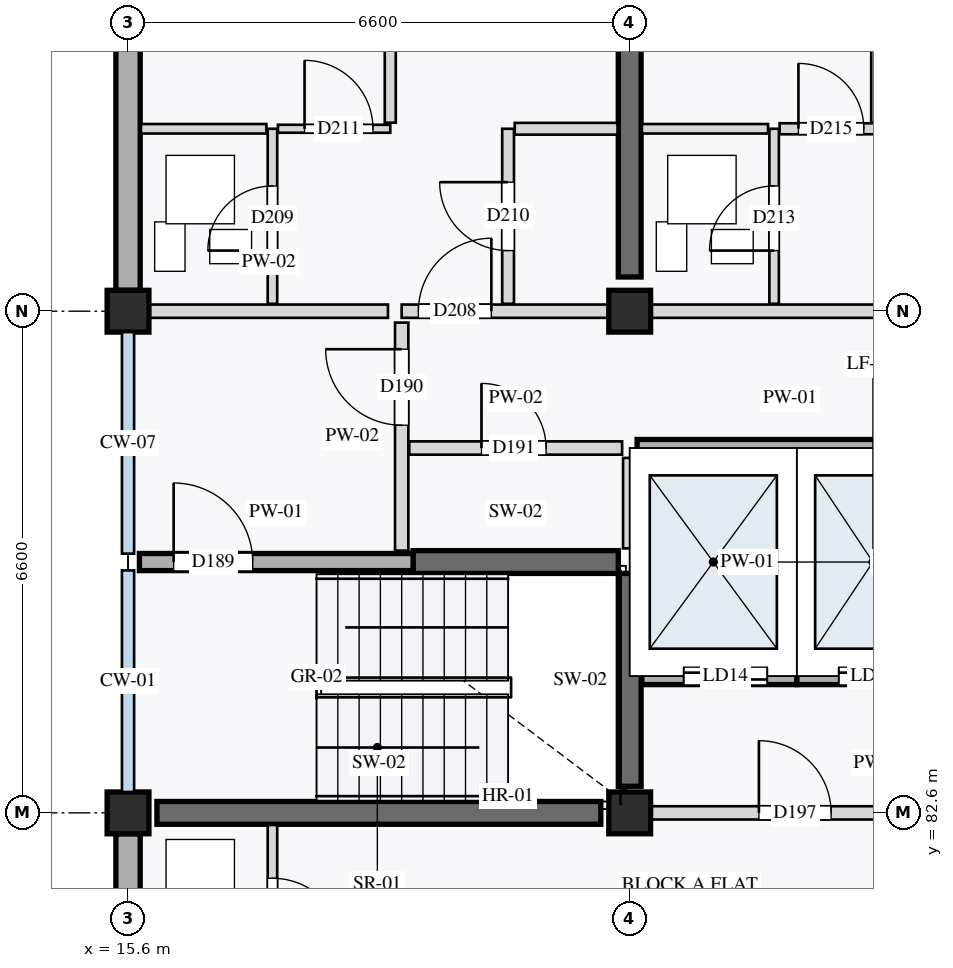
"""IFC4 building model, lengths in metres.
Left out: names, types, materials, properties, quantities, classifications, styles, units other than length and angle.
Written with IfcOpenShell. Run it as: python <this file> out.ifc"""

import sys

from ifc_helpers import new_model, si_unit, direction, frame, frame_2d, origin, origin_2d, place, context, subcontext, project, spatial, rectangle, extrude, element, fill, save


model = new_model("IFC4")
c1 = context("Model", 3, precision=1e-05, world=origin(), true_north=direction((0.0, 1.0)))
c2 = subcontext(c1, "Body", "Model", "MODEL_VIEW")
j1 = project(units=[si_unit("LENGTHUNIT", "METRE"), si_unit("PLANEANGLEUNIT", "RADIAN")], contexts=[c1])
p1 = place(None, origin())
s1 = spatial("IfcSite", under=j1, at=p1, CompositionType="ELEMENT")
p2 = place(p1, origin())
s2 = spatial("IfcBuilding", under=s1, at=p2, CompositionType="ELEMENT")
p3 = place(p2, frame((0.0, 0.0, 21.2)))
s3 = spatial("IfcBuildingStorey", under=s2, at=p3, CompositionType="ELEMENT", Elevation=21.2)
for number, where, z_axis, x_axis in (
    (1, (15.6, 82.6, 0.0), (0.0, 0.0, 1.0), (1.0, 0.0, 0.0)),
    (2, (15.6, 89.2, 0.0), (0.0, 0.0, 1.0), (1.0, 0.0, 0.0)),
    (3, (22.2, 82.6, 0.0), (0.0, 0.0, 1.0), (1.0, 0.0, 0.0)),
    (4, (22.2, 89.2, 0.0), (0.0, 0.0, 1.0), (1.0, 0.0, 0.0)),
):
    element("IfcColumn", number, at=place(p3, frame(where, z_axis=z_axis, x_axis=x_axis)), inside=s3, PredefinedType="COLUMN", context=c2, shape_type="SweptSolid", body=[
        extrude(rectangle(XDim=0.55, YDim=0.55, at=origin_2d()), origin(), (0.0, 0.0, 1.0), 3.2),
    ])
p4 = place(p3, frame((15.98, 82.6, 0.0), z_axis=(0.0, 0.0, 1.0), x_axis=(1.0, 0.0, 0.0)))
e5 = element("IfcWall", 5, at=p4, inside=s3, PredefinedType="SHEAR", context=c2, shape_type="SweptSolid", body=[
    extrude(rectangle(XDim=5.84, YDim=0.3, at=frame_2d((2.92, 0.0))), origin(), (0.0, 0.0, 1.0), 2.96),
])
p5 = place(p3, frame((19.35, 85.9, 0.0), z_axis=(0.0, 0.0, 1.0), x_axis=(1.0, 0.0, 0.0)))
e6 = element("IfcWall", 6, at=p5, inside=s3, PredefinedType="SHEAR", context=c2, shape_type="SweptSolid", body=[
    extrude(rectangle(XDim=2.7, YDim=0.3, at=frame_2d((1.35, 0.0))), origin(), (0.0, 0.0, 1.0), 2.96),
])
p6 = place(p3, frame((22.2, 82.95, 0.0), z_axis=(0.0, 0.0, 1.0), x_axis=(0.0, 1.0, 0.0)))
e7 = element("IfcWall", 7, at=p6, inside=s3, PredefinedType="SHEAR", context=c2, shape_type="SweptSolid", body=[
    extrude(rectangle(XDim=2.8, YDim=0.3, at=frame_2d((1.4, 0.0))), origin(), (0.0, 0.0, 1.0), 2.96),
])
p7 = place(p3, frame((22.2, 89.65, 0.0), z_axis=(0.0, 0.0, 1.0), x_axis=(0.0, 1.0, 0.0)))
e8 = element("IfcWall", 8, at=p7, inside=s3, PredefinedType="SHEAR", context=c2, shape_type="SweptSolid", body=[
    extrude(rectangle(XDim=5.7, YDim=0.3, at=frame_2d((2.85, 0.0))), origin(), (0.0, 0.0, 1.0), 2.96),
])
p8 = place(p3, frame((15.6, 76.275, 0.0), z_axis=(0.0, 0.0, 1.0), x_axis=(0.0, 1.0, 0.0)))
e9 = element("IfcWall", 9, at=p8, inside=s3, PredefinedType="STANDARD", context=c2, shape_type="SweptSolid", body=[
    extrude(rectangle(XDim=6.05, YDim=0.32, at=frame_2d((3.025, 0.0))), origin(), (0.0, 0.0, 1.0), 2.65),
])
p9 = place(p3, frame((15.6, 89.475, 0.0), z_axis=(0.0, 0.0, 1.0), x_axis=(0.0, 1.0, 0.0)))
e10 = element("IfcWall", 10, at=p9, inside=s3, PredefinedType="STANDARD", context=c2, shape_type="SweptSolid", body=[
    extrude(rectangle(XDim=6.05, YDim=0.32, at=frame_2d((3.025, 0.0))), origin(), (0.0, 0.0, 1.0), 2.65),
])
p10 = place(p3, frame((15.75, 85.9, 0.0), z_axis=(0.0, 0.0, 1.0), x_axis=(1.0, 0.0, 0.0)))
e11 = element("IfcWall", 11, at=p10, inside=s3, PredefinedType="STANDARD", context=c2, shape_type="SweptSolid", body=[
    extrude(rectangle(XDim=3.6, YDim=0.225, at=frame_2d((1.8, 0.0))), origin(), (0.0, 0.0, 1.0), 2.96),
])
p11 = place(p10, frame((0.45, 0.0, 0.0)))
e12 = element("IfcOpeningElement", 12, at=p11, cuts=e11, PredefinedType="OPENING", context=c2, shape_type="SweptSolid", body=[
    extrude(rectangle(XDim=1.04, YDim=2.12, at=frame_2d((0.52, 1.06))), frame((0.0, 0.123, 0.0), z_axis=(0.0, -1.0, 0.0), x_axis=(1.0, 0.0, 0.0)), (0.0, 0.0, 1.0), 0.245),
])
p12 = place(p3, frame((19.2, 86.05, 0.0), z_axis=(0.0, 0.0, 1.0), x_axis=(0.0, 1.0, 0.0)))
e13 = element("IfcWall", 13, at=p12, inside=s3, PredefinedType="PARTITIONING", context=c2, shape_type="SweptSolid", body=[
    extrude(rectangle(XDim=3.0, YDim=0.175, at=frame_2d((1.5, 0.0))), origin(), (0.0, 0.0, 1.0), 2.96),
])
p13 = place(p12, frame((1.65, 0.0, 0.0)))
e14 = element("IfcOpeningElement", 14, at=p13, cuts=e13, PredefinedType="OPENING", context=c2, shape_type="SweptSolid", body=[
    extrude(rectangle(XDim=1.0, YDim=2.1, at=frame_2d((0.5, 1.05))), frame((0.0, 0.097, 0.0), z_axis=(0.0, -1.0, 0.0), x_axis=(1.0, 0.0, 0.0)), (0.0, 0.0, 1.0), 0.195),
])
p14 = place(p3, frame((19.3, 87.4, 0.0), z_axis=(0.0, 0.0, 1.0), x_axis=(1.0, 0.0, 0.0)))
e15 = element("IfcWall", 15, at=p14, inside=s3, PredefinedType="PARTITIONING", context=c2, shape_type="SweptSolid", body=[
    extrude(rectangle(XDim=2.8, YDim=0.175, at=frame_2d((1.4, 0.0))), origin(), (0.0, 0.0, 1.0), 2.96),
])
p15 = place(p14, frame((0.95, 0.0, 0.0)))
e16 = element("IfcOpeningElement", 16, at=p15, cuts=e15, PredefinedType="OPENING", context=c2, shape_type="SweptSolid", body=[
    extrude(rectangle(XDim=0.85, YDim=2.0, at=frame_2d((0.425, 1.0))), frame((0.0, 0.097, 0.0), z_axis=(0.0, -1.0, 0.0), x_axis=(1.0, 0.0, 0.0)), (0.0, 0.0, 1.0), 0.195),
])
p16 = place(p3, frame((22.2, 86.08, 0.0), z_axis=(0.0, 0.0, 1.0), x_axis=(0.0, 1.0, 0.0)))
e17 = element("IfcWall", 17, at=p16, inside=s3, PredefinedType="PARTITIONING", context=c2, shape_type="SweptSolid", body=[
    extrude(rectangle(XDim=1.19, YDim=0.175, at=frame_2d((0.595, 0.0))), origin(), (0.0, 0.0, 1.0), 2.96),
])
p17 = place(p3, frame((22.36, 84.4, 0.0), z_axis=(0.0, 0.0, 1.0), x_axis=(1.0, 0.0, 0.0)))
e18 = element("IfcWall", 18, at=p17, inside=s3, PredefinedType="STANDARD", context=c2, shape_type="SweptSolid", body=[
    extrude(rectangle(XDim=2.04, YDim=0.225, at=frame_2d((1.02, 0.0))), origin(), (0.0, 0.0, 1.0), 2.96),
])
p18 = place(p17, frame((0.55, 0.0, 0.0)))
e19 = element("IfcOpeningElement", 19, at=p18, cuts=e18, PredefinedType="OPENING", context=c2, shape_type="SweptSolid", body=[
    extrude(rectangle(XDim=1.1, YDim=2.1, at=frame_2d((0.55, 1.05))), frame((0.0, 0.123, 0.0), z_axis=(0.0, -1.0, 0.0), x_axis=(1.0, 0.0, 0.0)), (0.0, 0.0, 1.0), 0.245),
])
p19 = place(p3, frame((24.4, 84.4, 0.0), z_axis=(0.0, 0.0, 1.0), x_axis=(1.0, 0.0, 0.0)))
e20 = element("IfcWall", 20, at=p19, inside=s3, PredefinedType="STANDARD", context=c2, shape_type="SweptSolid", body=[
    extrude(rectangle(XDim=2.0, YDim=0.225, at=frame_2d((1.0, 0.0))), origin(), (0.0, 0.0, 1.0), 2.96),
])
p20 = place(p19, frame((0.55, 0.0, 0.0)))
e21 = element("IfcOpeningElement", 21, at=p20, cuts=e20, PredefinedType="OPENING", context=c2, shape_type="SweptSolid", body=[
    extrude(rectangle(XDim=0.9, YDim=2.1, at=frame_2d((0.45, 1.05))), frame((0.0, 0.123, 0.0), z_axis=(0.0, -1.0, 0.0), x_axis=(1.0, 0.0, 0.0)), (0.0, 0.0, 1.0), 0.245),
])
p21 = place(p3, frame((22.298, 87.4, 0.0), z_axis=(0.0, 0.0, 1.0), x_axis=(1.0, 0.0, 0.0)))
e22 = element("IfcWall", 22, at=p21, inside=s3, PredefinedType="STANDARD", context=c2, shape_type="SweptSolid", body=[
    extrude(rectangle(XDim=4.022, YDim=0.225, at=frame_2d((2.011, 0.0))), origin(), (0.0, 0.0, 1.0), 2.96),
])
p22 = place(p3, frame((24.4, 84.58, 0.0), z_axis=(0.0, 0.0, 1.0), x_axis=(0.0, 1.0, 0.0)))
e23 = element("IfcWall", 23, at=p22, inside=s3, PredefinedType="STANDARD", context=c2, shape_type="SweptSolid", body=[
    extrude(rectangle(XDim=2.64, YDim=0.225, at=frame_2d((1.32, 0.0))), origin(), (0.0, 0.0, 1.0), 2.96),
])
p23 = place(p3, frame((22.2, 82.6, 0.0), z_axis=(0.0, 0.0, 1.0), x_axis=(1.0, 0.0, 0.0)))
e24 = element("IfcWall", 24, at=p23, inside=s3, PredefinedType="PARTITIONING", context=c2, shape_type="SweptSolid", body=[
    extrude(rectangle(XDim=6.6, YDim=0.175, at=frame_2d((3.3, 0.0))), origin(), (0.0, 0.0, 1.0), 2.55),
])
p24 = place(p23, frame((1.7, 0.0, 0.0)))
e25 = element("IfcOpeningElement", 25, at=p24, cuts=e24, PredefinedType="OPENING", context=c2, shape_type="SweptSolid", body=[
    extrude(rectangle(XDim=0.95, YDim=2.1, at=frame_2d((0.475, 1.05))), frame((0.0, 0.097, 0.0), z_axis=(0.0, -1.0, 0.0), x_axis=(1.0, 0.0, 0.0)), (0.0, 0.0, 1.0), 0.195),
])
p25 = place(p3, frame((17.5, 82.44, 0.0), z_axis=(0.0, 0.0, 1.0), x_axis=(0.0, -1.0, 0.0)))
e26 = element("IfcWall", 26, at=p25, inside=s3, PredefinedType="PARTITIONING", context=c2, shape_type="SweptSolid", body=[
    extrude(rectangle(XDim=2.24, YDim=0.125, at=frame_2d((1.12, 0.0))), origin(), (0.0, 0.0, 1.0), 2.96),
])
p26 = place(p25, frame((0.7, 0.0, 0.0)))
e27 = element("IfcOpeningElement", 27, at=p26, cuts=e26, PredefinedType="OPENING", context=c2, shape_type="SweptSolid", body=[
    extrude(rectangle(XDim=0.94, YDim=2.08, at=frame_2d((0.47, 1.04))), frame((0.0, 0.073, 0.0), z_axis=(0.0, -1.0, 0.0), x_axis=(1.0, 0.0, 0.0)), (0.0, 0.0, 1.0), 0.145),
])
p27 = place(p3, frame((15.88, 89.2, 0.0), z_axis=(0.0, 0.0, 1.0), x_axis=(1.0, 0.0, 0.0)))
e28 = element("IfcWall", 28, at=p27, inside=s3, PredefinedType="PARTITIONING", context=c2, shape_type="SweptSolid", body=[
    extrude(rectangle(XDim=3.14, YDim=0.175, at=frame_2d((1.57, 0.0))), origin(), (0.0, 0.0, 1.0), 2.55),
])
p28 = place(p3, frame((19.2, 89.2, 0.0), z_axis=(0.0, 0.0, 1.0), x_axis=(1.0, 0.0, 0.0)))
e29 = element("IfcWall", 29, at=p28, inside=s3, PredefinedType="PARTITIONING", context=c2, shape_type="SweptSolid", body=[
    extrude(rectangle(XDim=3.0, YDim=0.175, at=frame_2d((1.5, 0.0))), origin(), (0.0, 0.0, 1.0), 2.55),
])
p29 = place(p28, frame((0.22, 0.0, 0.0)))
e30 = element("IfcOpeningElement", 30, at=p29, cuts=e29, PredefinedType="OPENING", context=c2, shape_type="SweptSolid", body=[
    extrude(rectangle(XDim=0.96, YDim=2.18, at=frame_2d((0.48, 1.09))), frame((0.0, 0.097, 0.0), z_axis=(0.0, -1.0, 0.0), x_axis=(1.0, 0.0, 0.0)), (0.0, 0.0, 1.0), 0.195),
])
p30 = place(p3, frame((17.5, 89.298, 0.0), z_axis=(0.0, 0.0, 1.0), x_axis=(0.0, 1.0, 0.0)))
e31 = element("IfcWall", 31, at=p30, inside=s3, PredefinedType="PARTITIONING", context=c2, shape_type="SweptSolid", body=[
    extrude(rectangle(XDim=2.302, YDim=0.125, at=frame_2d((1.151, 0.0))), origin(), (0.0, 0.0, 1.0), 2.96),
])
p31 = place(p30, frame((0.7, 0.0, 0.0)))
e32 = element("IfcOpeningElement", 32, at=p31, cuts=e31, PredefinedType="OPENING", context=c2, shape_type="SweptSolid", body=[
    extrude(rectangle(XDim=0.85, YDim=2.04, at=frame_2d((0.425, 1.02))), frame((0.0, 0.073, 0.0), z_axis=(0.0, -1.0, 0.0), x_axis=(1.0, 0.0, 0.0)), (0.0, 0.0, 1.0), 0.145),
])
p32 = place(p3, frame((15.77, 91.6, 0.0), z_axis=(0.0, 0.0, 1.0), x_axis=(1.0, 0.0, 0.0)))
e33 = element("IfcWall", 33, at=p32, inside=s3, PredefinedType="PARTITIONING", context=c2, shape_type="SweptSolid", body=[
    extrude(rectangle(XDim=1.65, YDim=0.125, at=frame_2d((0.825, 0.0))), origin(), (0.0, 0.0, 1.0), 2.96),
])
p33 = place(p3, frame((20.6, 89.298, 0.0), z_axis=(0.0, 0.0, 1.0), x_axis=(0.0, 1.0, 0.0)))
e34 = element("IfcWall", 34, at=p33, inside=s3, PredefinedType="PARTITIONING", context=c2, shape_type="SweptSolid", body=[
    extrude(rectangle(XDim=2.302, YDim=0.155, at=frame_2d((1.151, 0.0))), origin(), (0.0, 0.0, 1.0), 2.96),
])
p34 = place(p33, frame((0.7, 0.0, 0.0)))
e35 = element("IfcOpeningElement", 35, at=p34, cuts=e34, PredefinedType="OPENING", context=c2, shape_type="SweptSolid", body=[
    extrude(rectangle(XDim=0.9, YDim=2.1, at=frame_2d((0.45, 1.05))), frame((0.0, 0.087, 0.0), z_axis=(0.0, -1.0, 0.0), x_axis=(1.0, 0.0, 0.0)), (0.0, 0.0, 1.0), 0.175),
])
p35 = place(p3, frame((20.688, 91.6, 0.0), z_axis=(0.0, 0.0, 1.0), x_axis=(1.0, 0.0, 0.0)))
e36 = element("IfcWall", 36, at=p35, inside=s3, PredefinedType="PARTITIONING", context=c2, shape_type="SweptSolid", body=[
    extrude(rectangle(XDim=1.353, YDim=0.155, at=frame_2d((0.676, 0.0))), origin(), (0.0, 0.0, 1.0), 2.96),
])
p36 = place(p3, frame((17.573, 91.6, 0.0), z_axis=(0.0, 0.0, 1.0), x_axis=(1.0, 0.0, 0.0)))
e37 = element("IfcWall", 37, at=p36, inside=s3, PredefinedType="PARTITIONING", context=c2, shape_type="SweptSolid", body=[
    extrude(rectangle(XDim=1.478, YDim=0.105, at=frame_2d((0.739, 0.0))), origin(), (0.0, 0.0, 1.0), 2.96),
])
p37 = place(p36, frame((0.35, 0.0, 0.0)))
e38 = element("IfcOpeningElement", 38, at=p37, cuts=e37, PredefinedType="OPENING", context=c2, shape_type="SweptSolid", body=[
    extrude(rectangle(XDim=0.9, YDim=2.16, at=frame_2d((0.45, 1.08))), frame((0.0, 0.062, 0.0), z_axis=(0.0, -1.0, 0.0), x_axis=(1.0, 0.0, 0.0)), (0.0, 0.0, 1.0), 0.125),
])
p38 = place(p3, frame((19.05, 91.68, 0.0), z_axis=(0.0, 0.0, 1.0), x_axis=(0.0, 1.0, 0.0)))
e39 = element("IfcWall", 39, at=p38, inside=s3, PredefinedType="PARTITIONING", context=c2, shape_type="SweptSolid", body=[
    extrude(rectangle(XDim=3.95, YDim=0.145, at=frame_2d((1.975, 0.0))), origin(), (0.0, 0.0, 1.0), 2.96),
])
p39 = place(p3, frame((22.2, 89.2, 0.0), z_axis=(0.0, 0.0, 1.0), x_axis=(1.0, 0.0, 0.0)))
e40 = element("IfcWall", 40, at=p39, inside=s3, PredefinedType="PARTITIONING", context=c2, shape_type="SweptSolid", body=[
    extrude(rectangle(XDim=6.6, YDim=0.175, at=frame_2d((3.3, 0.0))), origin(), (0.0, 0.0, 1.0), 2.55),
])
p40 = place(p39, frame((3.85, 0.0, 0.0)))
e41 = element("IfcOpeningElement", 41, at=p40, cuts=e40, PredefinedType="OPENING", context=c2, shape_type="SweptSolid", body=[
    extrude(rectangle(XDim=0.96, YDim=2.18, at=frame_2d((0.48, 1.09))), frame((0.0, 0.097, 0.0), z_axis=(0.0, -1.0, 0.0), x_axis=(1.0, 0.0, 0.0)), (0.0, 0.0, 1.0), 0.195),
])
p41 = place(p3, frame((24.1, 89.298, 0.0), z_axis=(0.0, 0.0, 1.0), x_axis=(0.0, 1.0, 0.0)))
e42 = element("IfcWall", 42, at=p41, inside=s3, PredefinedType="PARTITIONING", context=c2, shape_type="SweptSolid", body=[
    extrude(rectangle(XDim=2.302, YDim=0.125, at=frame_2d((1.151, 0.0))), origin(), (0.0, 0.0, 1.0), 2.96),
])
p42 = place(p41, frame((0.7, 0.0, 0.0)))
e43 = element("IfcOpeningElement", 43, at=p42, cuts=e42, PredefinedType="OPENING", context=c2, shape_type="SweptSolid", body=[
    extrude(rectangle(XDim=0.85, YDim=2.04, at=frame_2d((0.425, 1.02))), frame((0.0, 0.073, 0.0), z_axis=(0.0, -1.0, 0.0), x_axis=(1.0, 0.0, 0.0)), (0.0, 0.0, 1.0), 0.145),
])
p43 = place(p3, frame((22.36, 91.6, 0.0), z_axis=(0.0, 0.0, 1.0), x_axis=(1.0, 0.0, 0.0)))
e44 = element("IfcWall", 44, at=p43, inside=s3, PredefinedType="PARTITIONING", context=c2, shape_type="SweptSolid", body=[
    extrude(rectangle(XDim=1.66, YDim=0.125, at=frame_2d((0.83, 0.0))), origin(), (0.0, 0.0, 1.0), 2.96),
])
p44 = place(p3, frame((24.173, 91.6, 0.0), z_axis=(0.0, 0.0, 1.0), x_axis=(1.0, 0.0, 0.0)))
e45 = element("IfcWall", 45, at=p44, inside=s3, PredefinedType="PARTITIONING", context=c2, shape_type="SweptSolid", body=[
    extrude(rectangle(XDim=1.277, YDim=0.145, at=frame_2d((0.639, 0.0))), origin(), (0.0, 0.0, 1.0), 2.96),
])
p45 = place(p44, frame((0.248, 0.0, 0.0)))
e46 = element("IfcOpeningElement", 46, at=p45, cuts=e45, PredefinedType="OPENING", context=c2, shape_type="SweptSolid", body=[
    extrude(rectangle(XDim=0.86, YDim=2.12, at=frame_2d((0.43, 1.06))), frame((0.0, 0.083, 0.0), z_axis=(0.0, -1.0, 0.0), x_axis=(1.0, 0.0, 0.0)), (0.0, 0.0, 1.0), 0.165),
])
p46 = place(p3, frame((25.45, 91.683, 0.0), z_axis=(0.0, 0.0, 1.0), x_axis=(0.0, 1.0, 0.0)))
e47 = element("IfcWall", 47, at=p46, inside=s3, PredefinedType="PARTITIONING", context=c2, shape_type="SweptSolid", body=[
    extrude(rectangle(XDim=3.947, YDim=0.145, at=frame_2d((1.974, 0.0))), origin(), (0.0, 0.0, 1.0), 2.96),
])
p47 = place(p11, origin())
e48 = element("IfcDoor", 48, at=p47, inside=s3, OperationType="SINGLE_SWING_LEFT", PredefinedType="DOOR", context=c2, shape_type="SweptSolid", body=[
    extrude(rectangle(XDim=1.04, YDim=2.12, at=frame_2d((0.52, 1.06))), frame((0.0, 0.025, 0.0), z_axis=(0.0, -1.0, 0.0), x_axis=(1.0, 0.0, 0.0)), (0.0, 0.0, 1.0), 0.05),
])
fill(e12, e48)
p48 = place(p13, origin())
e49 = element("IfcDoor", 49, at=p48, inside=s3, OperationType="SINGLE_SWING_RIGHT", PredefinedType="DOOR", context=c2, shape_type="SweptSolid", body=[
    extrude(rectangle(XDim=1.0, YDim=2.1, at=frame_2d((0.5, 1.05))), frame((0.0, 0.025, 0.0), z_axis=(0.0, -1.0, 0.0), x_axis=(1.0, 0.0, 0.0)), (0.0, 0.0, 1.0), 0.05),
])
fill(e14, e49)
p49 = place(p15, origin())
e50 = element("IfcDoor", 50, at=p49, inside=s3, OperationType="SINGLE_SWING_LEFT", PredefinedType="DOOR", context=c2, shape_type="SweptSolid", body=[
    extrude(rectangle(XDim=0.85, YDim=2.0, at=frame_2d((0.425, 1.0))), frame((0.0, 0.025, 0.0), z_axis=(0.0, -1.0, 0.0), x_axis=(1.0, 0.0, 0.0)), (0.0, 0.0, 1.0), 0.05),
])
fill(e16, e50)
p50 = place(p18, origin())
e51 = element("IfcDoor", 51, at=p50, inside=s3, OperationType="DOUBLE_DOOR_SLIDING", PredefinedType="DOOR", context=c2, shape_type="SweptSolid", body=[
    extrude(rectangle(XDim=1.1, YDim=2.1, at=frame_2d((0.55, 1.05))), frame((0.0, 0.025, 0.0), z_axis=(0.0, -1.0, 0.0), x_axis=(1.0, 0.0, 0.0)), (0.0, 0.0, 1.0), 0.05),
])
fill(e19, e51)
p51 = place(p20, origin())
e52 = element("IfcDoor", 52, at=p51, inside=s3, OperationType="DOUBLE_DOOR_SLIDING", PredefinedType="DOOR", context=c2, shape_type="SweptSolid", body=[
    extrude(rectangle(XDim=0.9, YDim=2.1, at=frame_2d((0.45, 1.05))), frame((0.0, 0.025, 0.0), z_axis=(0.0, -1.0, 0.0), x_axis=(1.0, 0.0, 0.0)), (0.0, 0.0, 1.0), 0.05),
])
fill(e21, e52)
p52 = place(p24, origin())
e53 = element("IfcDoor", 53, at=p52, inside=s3, OperationType="SINGLE_SWING_LEFT", PredefinedType="DOOR", context=c2, shape_type="SweptSolid", body=[
    extrude(rectangle(XDim=0.95, YDim=2.1, at=frame_2d((0.475, 1.05))), frame((0.0, 0.025, 0.0), z_axis=(0.0, -1.0, 0.0), x_axis=(1.0, 0.0, 0.0)), (0.0, 0.0, 1.0), 0.05),
])
fill(e25, e53)
p53 = place(p26, origin())
e54 = element("IfcDoor", 54, at=p53, inside=s3, OperationType="SINGLE_SWING_RIGHT", PredefinedType="DOOR", context=c2, shape_type="SweptSolid", body=[
    extrude(rectangle(XDim=0.94, YDim=2.08, at=frame_2d((0.47, 1.04))), frame((0.0, 0.025, 0.0), z_axis=(0.0, -1.0, 0.0), x_axis=(1.0, 0.0, 0.0)), (0.0, 0.0, 1.0), 0.05),
])
fill(e27, e54)
p54 = place(p29, origin())
e55 = element("IfcDoor", 55, at=p54, inside=s3, OperationType="SINGLE_SWING_RIGHT", PredefinedType="DOOR", context=c2, shape_type="SweptSolid", body=[
    extrude(rectangle(XDim=0.96, YDim=2.18, at=frame_2d((0.48, 1.09))), frame((0.0, 0.025, 0.0), z_axis=(0.0, -1.0, 0.0), x_axis=(1.0, 0.0, 0.0)), (0.0, 0.0, 1.0), 0.05),
])
fill(e30, e55)
p55 = place(p31, origin())
e56 = element("IfcDoor", 56, at=p55, inside=s3, OperationType="SINGLE_SWING_LEFT", PredefinedType="DOOR", context=c2, shape_type="SweptSolid", body=[
    extrude(rectangle(XDim=0.85, YDim=2.04, at=frame_2d((0.425, 1.02))), frame((0.0, 0.025, 0.0), z_axis=(0.0, -1.0, 0.0), x_axis=(1.0, 0.0, 0.0)), (0.0, 0.0, 1.0), 0.05),
])
fill(e32, e56)
p56 = place(p34, origin())
e57 = element("IfcDoor", 57, at=p56, inside=s3, OperationType="SINGLE_SWING_RIGHT", PredefinedType="DOOR", context=c2, shape_type="SweptSolid", body=[
    extrude(rectangle(XDim=0.9, YDim=2.1, at=frame_2d((0.45, 1.05))), frame((0.0, 0.025, 0.0), z_axis=(0.0, -1.0, 0.0), x_axis=(1.0, 0.0, 0.0)), (0.0, 0.0, 1.0), 0.05),
])
fill(e35, e57)
p57 = place(p37, origin())
e58 = element("IfcDoor", 58, at=p57, inside=s3, OperationType="SINGLE_SWING_LEFT", PredefinedType="DOOR", context=c2, shape_type="SweptSolid", body=[
    extrude(rectangle(XDim=0.9, YDim=2.16, at=frame_2d((0.45, 1.08))), frame((0.0, 0.025, 0.0), z_axis=(0.0, -1.0, 0.0), x_axis=(1.0, 0.0, 0.0)), (0.0, 0.0, 1.0), 0.05),
])
fill(e38, e58)
p58 = place(p42, origin())
e59 = element("IfcDoor", 59, at=p58, inside=s3, OperationType="SINGLE_SWING_LEFT", PredefinedType="DOOR", context=c2, shape_type="SweptSolid", body=[
    extrude(rectangle(XDim=0.85, YDim=2.04, at=frame_2d((0.425, 1.02))), frame((0.0, 0.025, 0.0), z_axis=(0.0, -1.0, 0.0), x_axis=(1.0, 0.0, 0.0)), (0.0, 0.0, 1.0), 0.05),
])
fill(e43, e59)
p59 = place(p45, origin())
e60 = element("IfcDoor", 60, at=p59, inside=s3, OperationType="SINGLE_SWING_LEFT", PredefinedType="DOOR", context=c2, shape_type="SweptSolid", body=[
    extrude(rectangle(XDim=0.86, YDim=2.12, at=frame_2d((0.43, 1.06))), frame((0.0, 0.025, 0.0), z_axis=(0.0, -1.0, 0.0), x_axis=(1.0, 0.0, 0.0)), (0.0, 0.0, 1.0), 0.05),
])
fill(e46, e60)
save(model, sys.argv[1])
